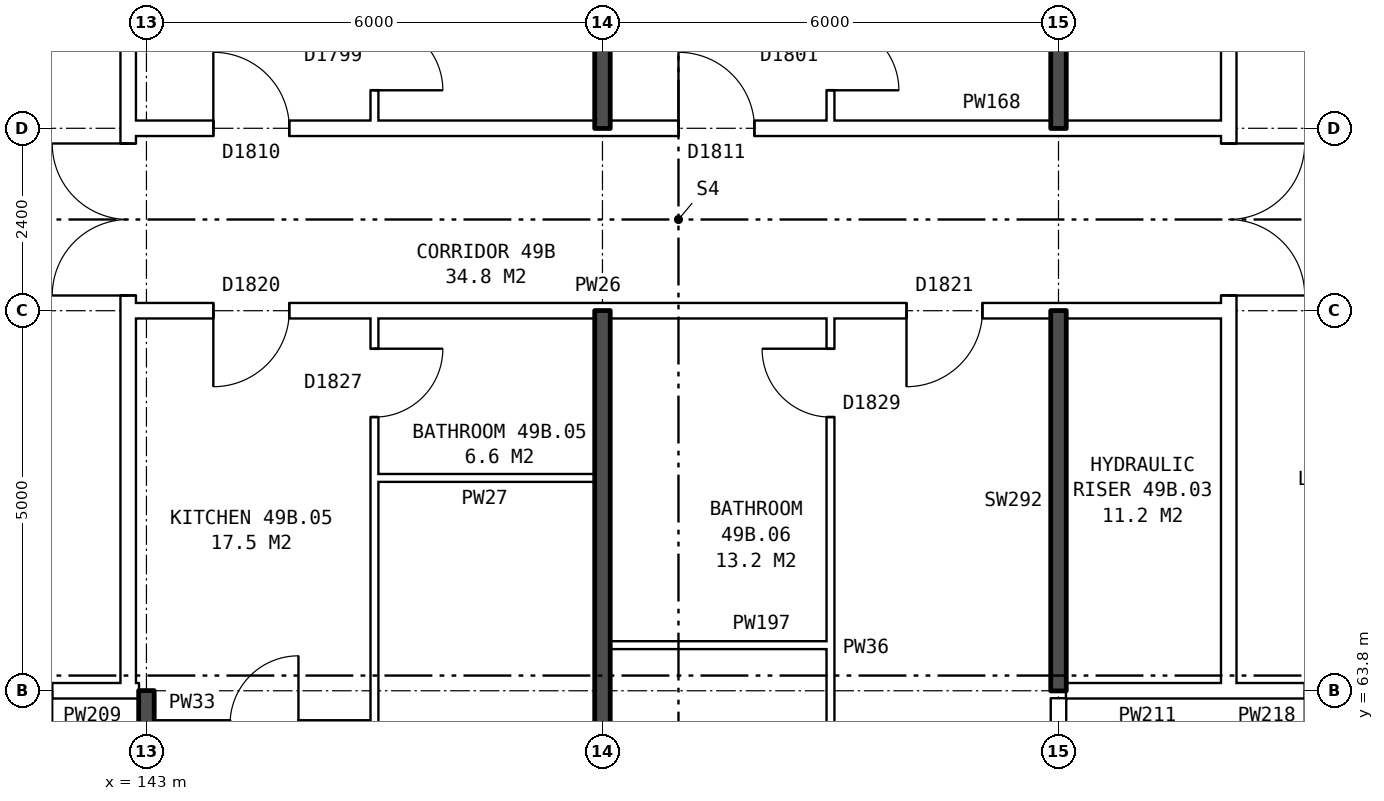
"""IFC4 building model, lengths in metres.
Left out: names, types, materials, properties, quantities, classifications, styles, units other than length and angle.
Written with IfcOpenShell. Run it as: python <this file> out.ifc"""

import sys

from ifc_helpers import new_model, si_unit, direction, frame, frame_2d, origin, place, context, subcontext, project, spatial, rectangle, extrude, element, fill, save


model = new_model("IFC4")
c1 = context("Model", 3, precision=1e-05, world=origin(), true_north=direction((0.0, 1.0)))
c2 = subcontext(c1, "Body", "Model", "MODEL_VIEW")
j1 = project(units=[si_unit("LENGTHUNIT", "METRE"), si_unit("PLANEANGLEUNIT", "RADIAN")], contexts=[c1])
p1 = place(None, origin())
s1 = spatial("IfcSite", under=j1, at=p1, CompositionType="ELEMENT")
p2 = place(p1, origin())
s2 = spatial("IfcBuilding", under=s1, at=p2, CompositionType="ELEMENT")
p3 = place(p2, frame((0.0, 0.0, 175.8)))
s3 = spatial("IfcBuildingStorey", under=s2, at=p3, CompositionType="ELEMENT", Elevation=175.8)
p4 = place(p3, frame((142.76, 63.9, 0.0), z_axis=(0.0, 0.0, 1.0), x_axis=(0.0, 1.0, 0.0)))
e1 = element("IfcWall", 1, at=p4, inside=s3, PredefinedType="PARTITIONING", context=c2, shape_type="SweptSolid", body=[
    extrude(rectangle(XDim=12.2, YDim=0.2, at=frame_2d((6.1, 0.0))), origin(), (0.0, 0.0, 1.0), 2.85),
])
p5 = place(p4, frame((5.1, 0.0, 0.0)))
e2 = element("IfcOpeningElement", 2, at=p5, cuts=e1, PredefinedType="OPENING", context=c2, shape_type="SweptSolid", body=[
    extrude(rectangle(XDim=2.0, YDim=2.1, at=frame_2d((1.0, 1.05))), frame((0.0, 0.11, 0.0), z_axis=(0.0, -1.0, 0.0), x_axis=(1.0, 0.0, 0.0)), (0.0, 0.0, 1.0), 0.22),
])
p6 = place(p3, frame((157.24, 63.9, 0.0), z_axis=(0.0, 0.0, 1.0), x_axis=(0.0, 1.0, 0.0)))
e3 = element("IfcWall", 3, at=p6, inside=s3, PredefinedType="PARTITIONING", context=c2, shape_type="SweptSolid", body=[
    extrude(rectangle(XDim=12.2, YDim=0.2, at=frame_2d((6.1, 0.0))), origin(), (0.0, 0.0, 1.0), 2.85),
])
p7 = place(p6, frame((5.1, 0.0, 0.0)))
e4 = element("IfcOpeningElement", 4, at=p7, cuts=e3, PredefinedType="OPENING", context=c2, shape_type="SweptSolid", body=[
    extrude(rectangle(XDim=2.0, YDim=2.1, at=frame_2d((1.0, 1.05))), frame((0.0, 0.11, 0.0), z_axis=(0.0, -1.0, 0.0), x_axis=(1.0, 0.0, 0.0)), (0.0, 0.0, 1.0), 0.22),
])
p8 = place(p3, frame((143.1, 63.36, 0.0), z_axis=(0.0, 0.0, 1.0), x_axis=(1.0, 0.0, 0.0)))
e5 = element("IfcWall", 5, at=p8, inside=s3, PredefinedType="PARTITIONING", context=c2, shape_type="SweptSolid", body=[
    extrude(rectangle(XDim=2.9, YDim=0.1, at=frame_2d((1.45, 0.0))), origin(), (0.0, 0.0, 1.0), 2.85),
])
p9 = place(p8, frame((1.0, 0.0, 0.0)))
e6 = element("IfcOpeningElement", 6, at=p9, cuts=e5, PredefinedType="OPENING", context=c2, shape_type="SweptSolid", body=[
    extrude(rectangle(XDim=0.9, YDim=2.1, at=frame_2d((0.45, 1.05))), frame((0.0, 0.06, 0.0), z_axis=(0.0, -1.0, 0.0), x_axis=(1.0, 0.0, 0.0)), (0.0, 0.0, 1.0), 0.12),
])
p10 = place(p3, frame((139.76, 63.8, 0.0), z_axis=(0.0, 0.0, 1.0), x_axis=(1.0, 0.0, 0.0)))
e7 = element("IfcWall", 7, at=p10, inside=s3, PredefinedType="PARTITIONING", context=c2, shape_type="SweptSolid", body=[
    extrude(rectangle(XDim=3.0, YDim=0.2, at=frame_2d((1.5, 0.0))), origin(), (0.0, 0.0, 1.0), 2.85),
])
p11 = place(p10, frame((1.0, 0.0, 0.0)))
e8 = element("IfcOpeningElement", 8, at=p11, cuts=e7, PredefinedType="OPENING", context=c2, shape_type="SweptSolid", body=[
    extrude(rectangle(XDim=1.0, YDim=2.1, at=frame_2d((0.5, 1.05))), frame((0.0, 0.11, 0.0), z_axis=(0.0, -1.0, 0.0), x_axis=(1.0, 0.0, 0.0)), (0.0, 0.0, 1.0), 0.22),
])
p12 = place(p3, frame((142.76, 63.8, 0.0), z_axis=(0.0, 0.0, 1.0), x_axis=(1.0, 0.0, 0.0)))
e9 = element("IfcWall", 9, at=p12, inside=s3, PredefinedType="PARTITIONING", context=c2, shape_type="SweptSolid", body=[
    extrude(rectangle(XDim=0.14, YDim=0.2, at=frame_2d((0.07, 0.0))), origin(), (0.0, 0.0, 1.0), 2.85),
])
p13 = place(p3, frame((155.1, 63.8, 0.0), z_axis=(0.0, 0.0, 1.0), x_axis=(1.0, 0.0, 0.0)))
e10 = element("IfcWall", 10, at=p13, inside=s3, PredefinedType="PARTITIONING", context=c2, shape_type="SweptSolid", body=[
    extrude(rectangle(XDim=2.14, YDim=0.2, at=frame_2d((1.07, 0.0))), origin(), (0.0, 0.0, 1.0), 2.85),
])
p14 = place(p3, frame((157.24, 63.8, 0.0), z_axis=(0.0, 0.0, 1.0), x_axis=(1.0, 0.0, 0.0)))
e11 = element("IfcWall", 11, at=p14, inside=s3, PredefinedType="PARTITIONING", context=c2, shape_type="SweptSolid", body=[
    extrude(rectangle(XDim=3.0, YDim=0.2, at=frame_2d((1.5, 0.0))), origin(), (0.0, 0.0, 1.0), 2.85),
])
p15 = place(p14, frame((1.0, 0.0, 0.0)))
e12 = element("IfcOpeningElement", 12, at=p15, cuts=e11, PredefinedType="OPENING", context=c2, shape_type="SweptSolid", body=[
    extrude(rectangle(XDim=1.0, YDim=2.1, at=frame_2d((0.5, 1.05))), frame((0.0, 0.11, 0.0), z_axis=(0.0, -1.0, 0.0), x_axis=(1.0, 0.0, 0.0)), (0.0, 0.0, 1.0), 0.22),
])
for number, where, z_axis, x_axis in (
    (13, (149.1, 64.4, 0.0), (0.0, 0.0, 1.0), (1.0, 0.0, 0.0)),
    (14, (146.0, 66.6, 0.0), (0.0, 0.0, 1.0), (1.0, 0.0, 0.0)),
):
    element("IfcWall", number, at=place(p3, frame(where, z_axis=z_axis, x_axis=x_axis)), inside=s3, PredefinedType="PARTITIONING", context=c2, shape_type="SweptSolid", body=[
        extrude(rectangle(XDim=2.9, YDim=0.1, at=frame_2d((1.45, 0.0))), origin(), (0.0, 0.0, 1.0), 2.85),
    ])
p16 = place(p3, frame((142.76, 68.8, 0.0), z_axis=(0.0, 0.0, 1.0), x_axis=(1.0, 0.0, 0.0)))
e15 = element("IfcWall", 15, at=p16, inside=s3, PredefinedType="PARTITIONING", context=c2, shape_type="SweptSolid", body=[
    extrude(rectangle(XDim=14.48, YDim=0.2, at=frame_2d((7.24, 0.0))), origin(), (0.0, 0.0, 1.0), 2.85),
])
p17 = place(p16, frame((1.12, 0.0, 0.0)))
e16 = element("IfcOpeningElement", 16, at=p17, cuts=e15, PredefinedType="OPENING", context=c2, shape_type="SweptSolid", body=[
    extrude(rectangle(XDim=1.0, YDim=2.1, at=frame_2d((0.5, 1.05))), frame((0.0, 0.11, 0.0), z_axis=(0.0, -1.0, 0.0), x_axis=(1.0, 0.0, 0.0)), (0.0, 0.0, 1.0), 0.22),
])
p18 = place(p16, frame((10.24, 0.0, 0.0)))
e17 = element("IfcOpeningElement", 17, at=p18, cuts=e15, PredefinedType="OPENING", context=c2, shape_type="SweptSolid", body=[
    extrude(rectangle(XDim=1.0, YDim=2.1, at=frame_2d((0.5, 1.05))), frame((0.0, 0.11, 0.0), z_axis=(0.0, -1.0, 0.0), x_axis=(1.0, 0.0, 0.0)), (0.0, 0.0, 1.0), 0.22),
])
p19 = place(p3, frame((142.76, 71.2, 0.0), z_axis=(0.0, 0.0, 1.0), x_axis=(1.0, 0.0, 0.0)))
e18 = element("IfcWall", 18, at=p19, inside=s3, PredefinedType="PARTITIONING", context=c2, shape_type="SweptSolid", body=[
    extrude(rectangle(XDim=14.48, YDim=0.2, at=frame_2d((7.24, 0.0))), origin(), (0.0, 0.0, 1.0), 2.85),
])
p20 = place(p19, frame((1.12, 0.0, 0.0)))
e19 = element("IfcOpeningElement", 19, at=p20, cuts=e18, PredefinedType="OPENING", context=c2, shape_type="SweptSolid", body=[
    extrude(rectangle(XDim=1.0, YDim=2.1, at=frame_2d((0.5, 1.05))), frame((0.0, 0.11, 0.0), z_axis=(0.0, -1.0, 0.0), x_axis=(1.0, 0.0, 0.0)), (0.0, 0.0, 1.0), 0.22),
])
p21 = place(p19, frame((7.24, 0.0, 0.0)))
e20 = element("IfcOpeningElement", 20, at=p21, cuts=e18, PredefinedType="OPENING", context=c2, shape_type="SweptSolid", body=[
    extrude(rectangle(XDim=1.0, YDim=2.1, at=frame_2d((0.5, 1.05))), frame((0.0, 0.11, 0.0), z_axis=(0.0, -1.0, 0.0), x_axis=(1.0, 0.0, 0.0)), (0.0, 0.0, 1.0), 0.22),
])
p22 = place(p3, frame((143.0, 54.36, 0.0), z_axis=(0.0, 0.0, 1.0), x_axis=(0.0, 1.0, 0.0)))
e21 = element("IfcWall", 21, at=p22, inside=s3, PredefinedType="SOLIDWALL", context=c2, shape_type="SweptSolid", body=[
    extrude(rectangle(XDim=9.44, YDim=0.2, at=frame_2d((4.72, 0.0))), origin(), (0.0, 0.0, 1.0), 2.85),
])
p23 = place(p3, frame((146.0, 54.36, 0.0), z_axis=(0.0, 0.0, 1.0), x_axis=(0.0, 1.0, 0.0)))
e22 = element("IfcWall", 22, at=p23, inside=s3, PredefinedType="PARTITIONING", context=c2, shape_type="SweptSolid", body=[
    extrude(rectangle(XDim=14.34, YDim=0.1, at=frame_2d((7.17, 0.0))), origin(), (0.0, 0.0, 1.0), 2.85),
])
p24 = place(p23, frame((7.7, 0.0, 0.0)))
e23 = element("IfcOpeningElement", 23, at=p24, cuts=e22, PredefinedType="OPENING", context=c2, shape_type="SweptSolid", body=[
    extrude(rectangle(XDim=0.9, YDim=2.1, at=frame_2d((0.45, 1.05))), frame((0.0, 0.06, 0.0), z_axis=(0.0, -1.0, 0.0), x_axis=(1.0, 0.0, 0.0)), (0.0, 0.0, 1.0), 0.12),
])
p25 = place(p23, frame((13.04, 0.0, 0.0)))
e24 = element("IfcOpeningElement", 24, at=p25, cuts=e22, PredefinedType="OPENING", context=c2, shape_type="SweptSolid", body=[
    extrude(rectangle(XDim=0.9, YDim=2.1, at=frame_2d((0.45, 1.05))), frame((0.0, 0.06, 0.0), z_axis=(0.0, -1.0, 0.0), x_axis=(1.0, 0.0, 0.0)), (0.0, 0.0, 1.0), 0.12),
])
p26 = place(p3, frame((146.0, 71.3, 0.0), z_axis=(0.0, 0.0, 1.0), x_axis=(0.0, 1.0, 0.0)))
e25 = element("IfcWall", 25, at=p26, inside=s3, PredefinedType="PARTITIONING", context=c2, shape_type="SweptSolid", body=[
    extrude(rectangle(XDim=14.34, YDim=0.1, at=frame_2d((7.17, 0.0))), origin(), (0.0, 0.0, 1.0), 2.85),
])
p27 = place(p26, frame((5.74, 0.0, 0.0)))
e26 = element("IfcOpeningElement", 26, at=p27, cuts=e25, PredefinedType="OPENING", context=c2, shape_type="SweptSolid", body=[
    extrude(rectangle(XDim=0.9, YDim=2.1, at=frame_2d((0.45, 1.05))), frame((0.0, 0.06, 0.0), z_axis=(0.0, -1.0, 0.0), x_axis=(1.0, 0.0, 0.0)), (0.0, 0.0, 1.0), 0.12),
])
p28 = place(p26, frame((0.4, 0.0, 0.0)))
e27 = element("IfcOpeningElement", 27, at=p28, cuts=e25, PredefinedType="OPENING", context=c2, shape_type="SweptSolid", body=[
    extrude(rectangle(XDim=0.9, YDim=2.1, at=frame_2d((0.45, 1.05))), frame((0.0, 0.06, 0.0), z_axis=(0.0, -1.0, 0.0), x_axis=(1.0, 0.0, 0.0)), (0.0, 0.0, 1.0), 0.12),
])
for number, where, z_axis, x_axis in (
    (28, (149.0, 54.36, 0.0), (0.0, 0.0, 1.0), (0.0, 1.0, 0.0)),
    (29, (149.0, 71.2, 0.0), (0.0, 0.0, 1.0), (0.0, 1.0, 0.0)),
):
    element("IfcWall", number, at=place(p3, frame(where, z_axis=z_axis, x_axis=x_axis)), inside=s3, PredefinedType="SOLIDWALL", context=c2, shape_type="SweptSolid", body=[
        extrude(rectangle(XDim=14.44, YDim=0.2, at=frame_2d((7.22, 0.0))), origin(), (0.0, 0.0, 1.0), 2.85),
    ])
p29 = place(p3, frame((152.0, 54.36, 0.0), z_axis=(0.0, 0.0, 1.0), x_axis=(0.0, 1.0, 0.0)))
e30 = element("IfcWall", 30, at=p29, inside=s3, PredefinedType="PARTITIONING", context=c2, shape_type="SweptSolid", body=[
    extrude(rectangle(XDim=14.34, YDim=0.1, at=frame_2d((7.17, 0.0))), origin(), (0.0, 0.0, 1.0), 2.85),
])
p30 = place(p29, frame((5.5, 0.0, 0.0)))
e31 = element("IfcOpeningElement", 31, at=p30, cuts=e30, PredefinedType="OPENING", context=c2, shape_type="SweptSolid", body=[
    extrude(rectangle(XDim=0.9, YDim=2.1, at=frame_2d((0.45, 1.05))), frame((0.0, 0.06, 0.0), z_axis=(0.0, -1.0, 0.0), x_axis=(1.0, 0.0, 0.0)), (0.0, 0.0, 1.0), 0.12),
])
p31 = place(p29, frame((13.04, 0.0, 0.0)))
e32 = element("IfcOpeningElement", 32, at=p31, cuts=e30, PredefinedType="OPENING", context=c2, shape_type="SweptSolid", body=[
    extrude(rectangle(XDim=0.9, YDim=2.1, at=frame_2d((0.45, 1.05))), frame((0.0, 0.06, 0.0), z_axis=(0.0, -1.0, 0.0), x_axis=(1.0, 0.0, 0.0)), (0.0, 0.0, 1.0), 0.12),
])
p32 = place(p3, frame((152.0, 71.3, 0.0), z_axis=(0.0, 0.0, 1.0), x_axis=(0.0, 1.0, 0.0)))
e33 = element("IfcWall", 33, at=p32, inside=s3, PredefinedType="PARTITIONING", context=c2, shape_type="SweptSolid", body=[
    extrude(rectangle(XDim=14.34, YDim=0.1, at=frame_2d((7.17, 0.0))), origin(), (0.0, 0.0, 1.0), 2.85),
])
p33 = place(p32, frame((6.74, 0.0, 0.0)))
e34 = element("IfcOpeningElement", 34, at=p33, cuts=e33, PredefinedType="OPENING", context=c2, shape_type="SweptSolid", body=[
    extrude(rectangle(XDim=0.9, YDim=2.1, at=frame_2d((0.45, 1.05))), frame((0.0, 0.06, 0.0), z_axis=(0.0, -1.0, 0.0), x_axis=(1.0, 0.0, 0.0)), (0.0, 0.0, 1.0), 0.12),
])
p34 = place(p32, frame((0.4, 0.0, 0.0)))
e35 = element("IfcOpeningElement", 35, at=p34, cuts=e33, PredefinedType="OPENING", context=c2, shape_type="SweptSolid", body=[
    extrude(rectangle(XDim=0.9, YDim=2.1, at=frame_2d((0.45, 1.05))), frame((0.0, 0.06, 0.0), z_axis=(0.0, -1.0, 0.0), x_axis=(1.0, 0.0, 0.0)), (0.0, 0.0, 1.0), 0.12),
])
p35 = place(p3, frame((155.0, 61.5, 0.0), z_axis=(0.0, 0.0, 1.0), x_axis=(0.0, 1.0, 0.0)))
e36 = element("IfcWall", 36, at=p35, inside=s3, PredefinedType="PARTITIONING", context=c2, shape_type="SweptSolid", body=[
    extrude(rectangle(XDim=2.2, YDim=0.2, at=frame_2d((1.1, 0.0))), origin(), (0.0, 0.0, 1.0), 2.85),
])
for number, where, z_axis, x_axis in (
    (37, (155.0, 63.8, 0.0), (0.0, 0.0, 1.0), (0.0, 1.0, 0.0)),
    (38, (155.0, 71.2, 0.0), (0.0, 0.0, 1.0), (0.0, 1.0, 0.0)),
):
    element("IfcWall", number, at=place(p3, frame(where, z_axis=z_axis, x_axis=x_axis)), inside=s3, PredefinedType="SOLIDWALL", context=c2, shape_type="SweptSolid", body=[
        extrude(rectangle(XDim=5.0, YDim=0.2, at=frame_2d((2.5, 0.0))), origin(), (0.0, 0.0, 1.0), 2.85),
    ])
p36 = place(p5, origin())
e39 = element("IfcDoor", 39, at=p36, inside=s3, OperationType="DOUBLE_DOOR_SINGLE_SWING", PredefinedType="DOOR", context=c2, shape_type="SweptSolid", body=[
    extrude(rectangle(XDim=2.0, YDim=2.1, at=frame_2d((1.0, 1.05))), frame((0.0, 0.025, 0.0), z_axis=(0.0, -1.0, 0.0), x_axis=(1.0, 0.0, 0.0)), (0.0, 0.0, 1.0), 0.05),
])
fill(e2, e39)
p37 = place(p7, frame((2.0, 0.0, 0.0), z_axis=(0.0, 0.0, 1.0), x_axis=(-1.0, 0.0, 0.0)))
e40 = element("IfcDoor", 40, at=p37, inside=s3, OperationType="DOUBLE_DOOR_SINGLE_SWING", PredefinedType="DOOR", context=c2, shape_type="SweptSolid", body=[
    extrude(rectangle(XDim=2.0, YDim=2.1, at=frame_2d((1.0, 1.05))), frame((0.0, 0.025, 0.0), z_axis=(0.0, -1.0, 0.0), x_axis=(1.0, 0.0, 0.0)), (0.0, 0.0, 1.0), 0.05),
])
fill(e4, e40)
p38 = place(p17, frame((1.0, 0.0, 0.0), z_axis=(0.0, 0.0, 1.0), x_axis=(-1.0, 0.0, 0.0)))
e41 = element("IfcDoor", 41, at=p38, inside=s3, OperationType="SINGLE_SWING_RIGHT", PredefinedType="DOOR", context=c2, shape_type="SweptSolid", body=[
    extrude(rectangle(XDim=1.0, YDim=2.1, at=frame_2d((0.5, 1.05))), frame((0.0, 0.025, 0.0), z_axis=(0.0, -1.0, 0.0), x_axis=(1.0, 0.0, 0.0)), (0.0, 0.0, 1.0), 0.05),
])
fill(e16, e41)
p39 = place(p25, frame((0.9, 0.0, 0.0), z_axis=(0.0, 0.0, 1.0), x_axis=(-1.0, 0.0, 0.0)))
e42 = element("IfcDoor", 42, at=p39, inside=s3, OperationType="SINGLE_SWING_LEFT", PredefinedType="DOOR", context=c2, shape_type="SweptSolid", body=[
    extrude(rectangle(XDim=0.9, YDim=2.1, at=frame_2d((0.45, 1.05))), frame((0.0, 0.025, 0.0), z_axis=(0.0, -1.0, 0.0), x_axis=(1.0, 0.0, 0.0)), (0.0, 0.0, 1.0), 0.05),
])
fill(e24, e42)
p40 = place(p18, frame((1.0, 0.0, 0.0), z_axis=(0.0, 0.0, 1.0), x_axis=(-1.0, 0.0, 0.0)))
e43 = element("IfcDoor", 43, at=p40, inside=s3, OperationType="SINGLE_SWING_RIGHT", PredefinedType="DOOR", context=c2, shape_type="SweptSolid", body=[
    extrude(rectangle(XDim=1.0, YDim=2.1, at=frame_2d((0.5, 1.05))), frame((0.0, 0.025, 0.0), z_axis=(0.0, -1.0, 0.0), x_axis=(1.0, 0.0, 0.0)), (0.0, 0.0, 1.0), 0.05),
])
fill(e17, e43)
p41 = place(p31, origin())
e44 = element("IfcDoor", 44, at=p41, inside=s3, OperationType="SINGLE_SWING_RIGHT", PredefinedType="DOOR", context=c2, shape_type="SweptSolid", body=[
    extrude(rectangle(XDim=0.9, YDim=2.1, at=frame_2d((0.45, 1.05))), frame((0.0, 0.025, 0.0), z_axis=(0.0, -1.0, 0.0), x_axis=(1.0, 0.0, 0.0)), (0.0, 0.0, 1.0), 0.05),
])
fill(e32, e44)
p42 = place(p20, origin())
e45 = element("IfcDoor", 45, at=p42, inside=s3, OperationType="SINGLE_SWING_LEFT", PredefinedType="DOOR", context=c2, shape_type="SweptSolid", body=[
    extrude(rectangle(XDim=1.0, YDim=2.1, at=frame_2d((0.5, 1.05))), frame((0.0, 0.025, 0.0), z_axis=(0.0, -1.0, 0.0), x_axis=(1.0, 0.0, 0.0)), (0.0, 0.0, 1.0), 0.05),
])
fill(e19, e45)
p43 = place(p28, frame((0.9, 0.0, 0.0), z_axis=(0.0, 0.0, 1.0), x_axis=(-1.0, 0.0, 0.0)))
e46 = element("IfcDoor", 46, at=p43, inside=s3, OperationType="SINGLE_SWING_RIGHT", PredefinedType="DOOR", context=c2, shape_type="SweptSolid", body=[
    extrude(rectangle(XDim=0.9, YDim=2.1, at=frame_2d((0.45, 1.05))), frame((0.0, 0.025, 0.0), z_axis=(0.0, -1.0, 0.0), x_axis=(1.0, 0.0, 0.0)), (0.0, 0.0, 1.0), 0.05),
])
fill(e27, e46)
p44 = place(p21, origin())
e47 = element("IfcDoor", 47, at=p44, inside=s3, OperationType="SINGLE_SWING_LEFT", PredefinedType="DOOR", context=c2, shape_type="SweptSolid", body=[
    extrude(rectangle(XDim=1.0, YDim=2.1, at=frame_2d((0.5, 1.05))), frame((0.0, 0.025, 0.0), z_axis=(0.0, -1.0, 0.0), x_axis=(1.0, 0.0, 0.0)), (0.0, 0.0, 1.0), 0.05),
])
fill(e20, e47)
p45 = place(p34, frame((0.9, 0.0, 0.0), z_axis=(0.0, 0.0, 1.0), x_axis=(-1.0, 0.0, 0.0)))
e48 = element("IfcDoor", 48, at=p45, inside=s3, OperationType="SINGLE_SWING_RIGHT", PredefinedType="DOOR", context=c2, shape_type="SweptSolid", body=[
    extrude(rectangle(XDim=0.9, YDim=2.1, at=frame_2d((0.45, 1.05))), frame((0.0, 0.025, 0.0), z_axis=(0.0, -1.0, 0.0), x_axis=(1.0, 0.0, 0.0)), (0.0, 0.0, 1.0), 0.05),
])
fill(e35, e48)
save(model, sys.argv[1])
